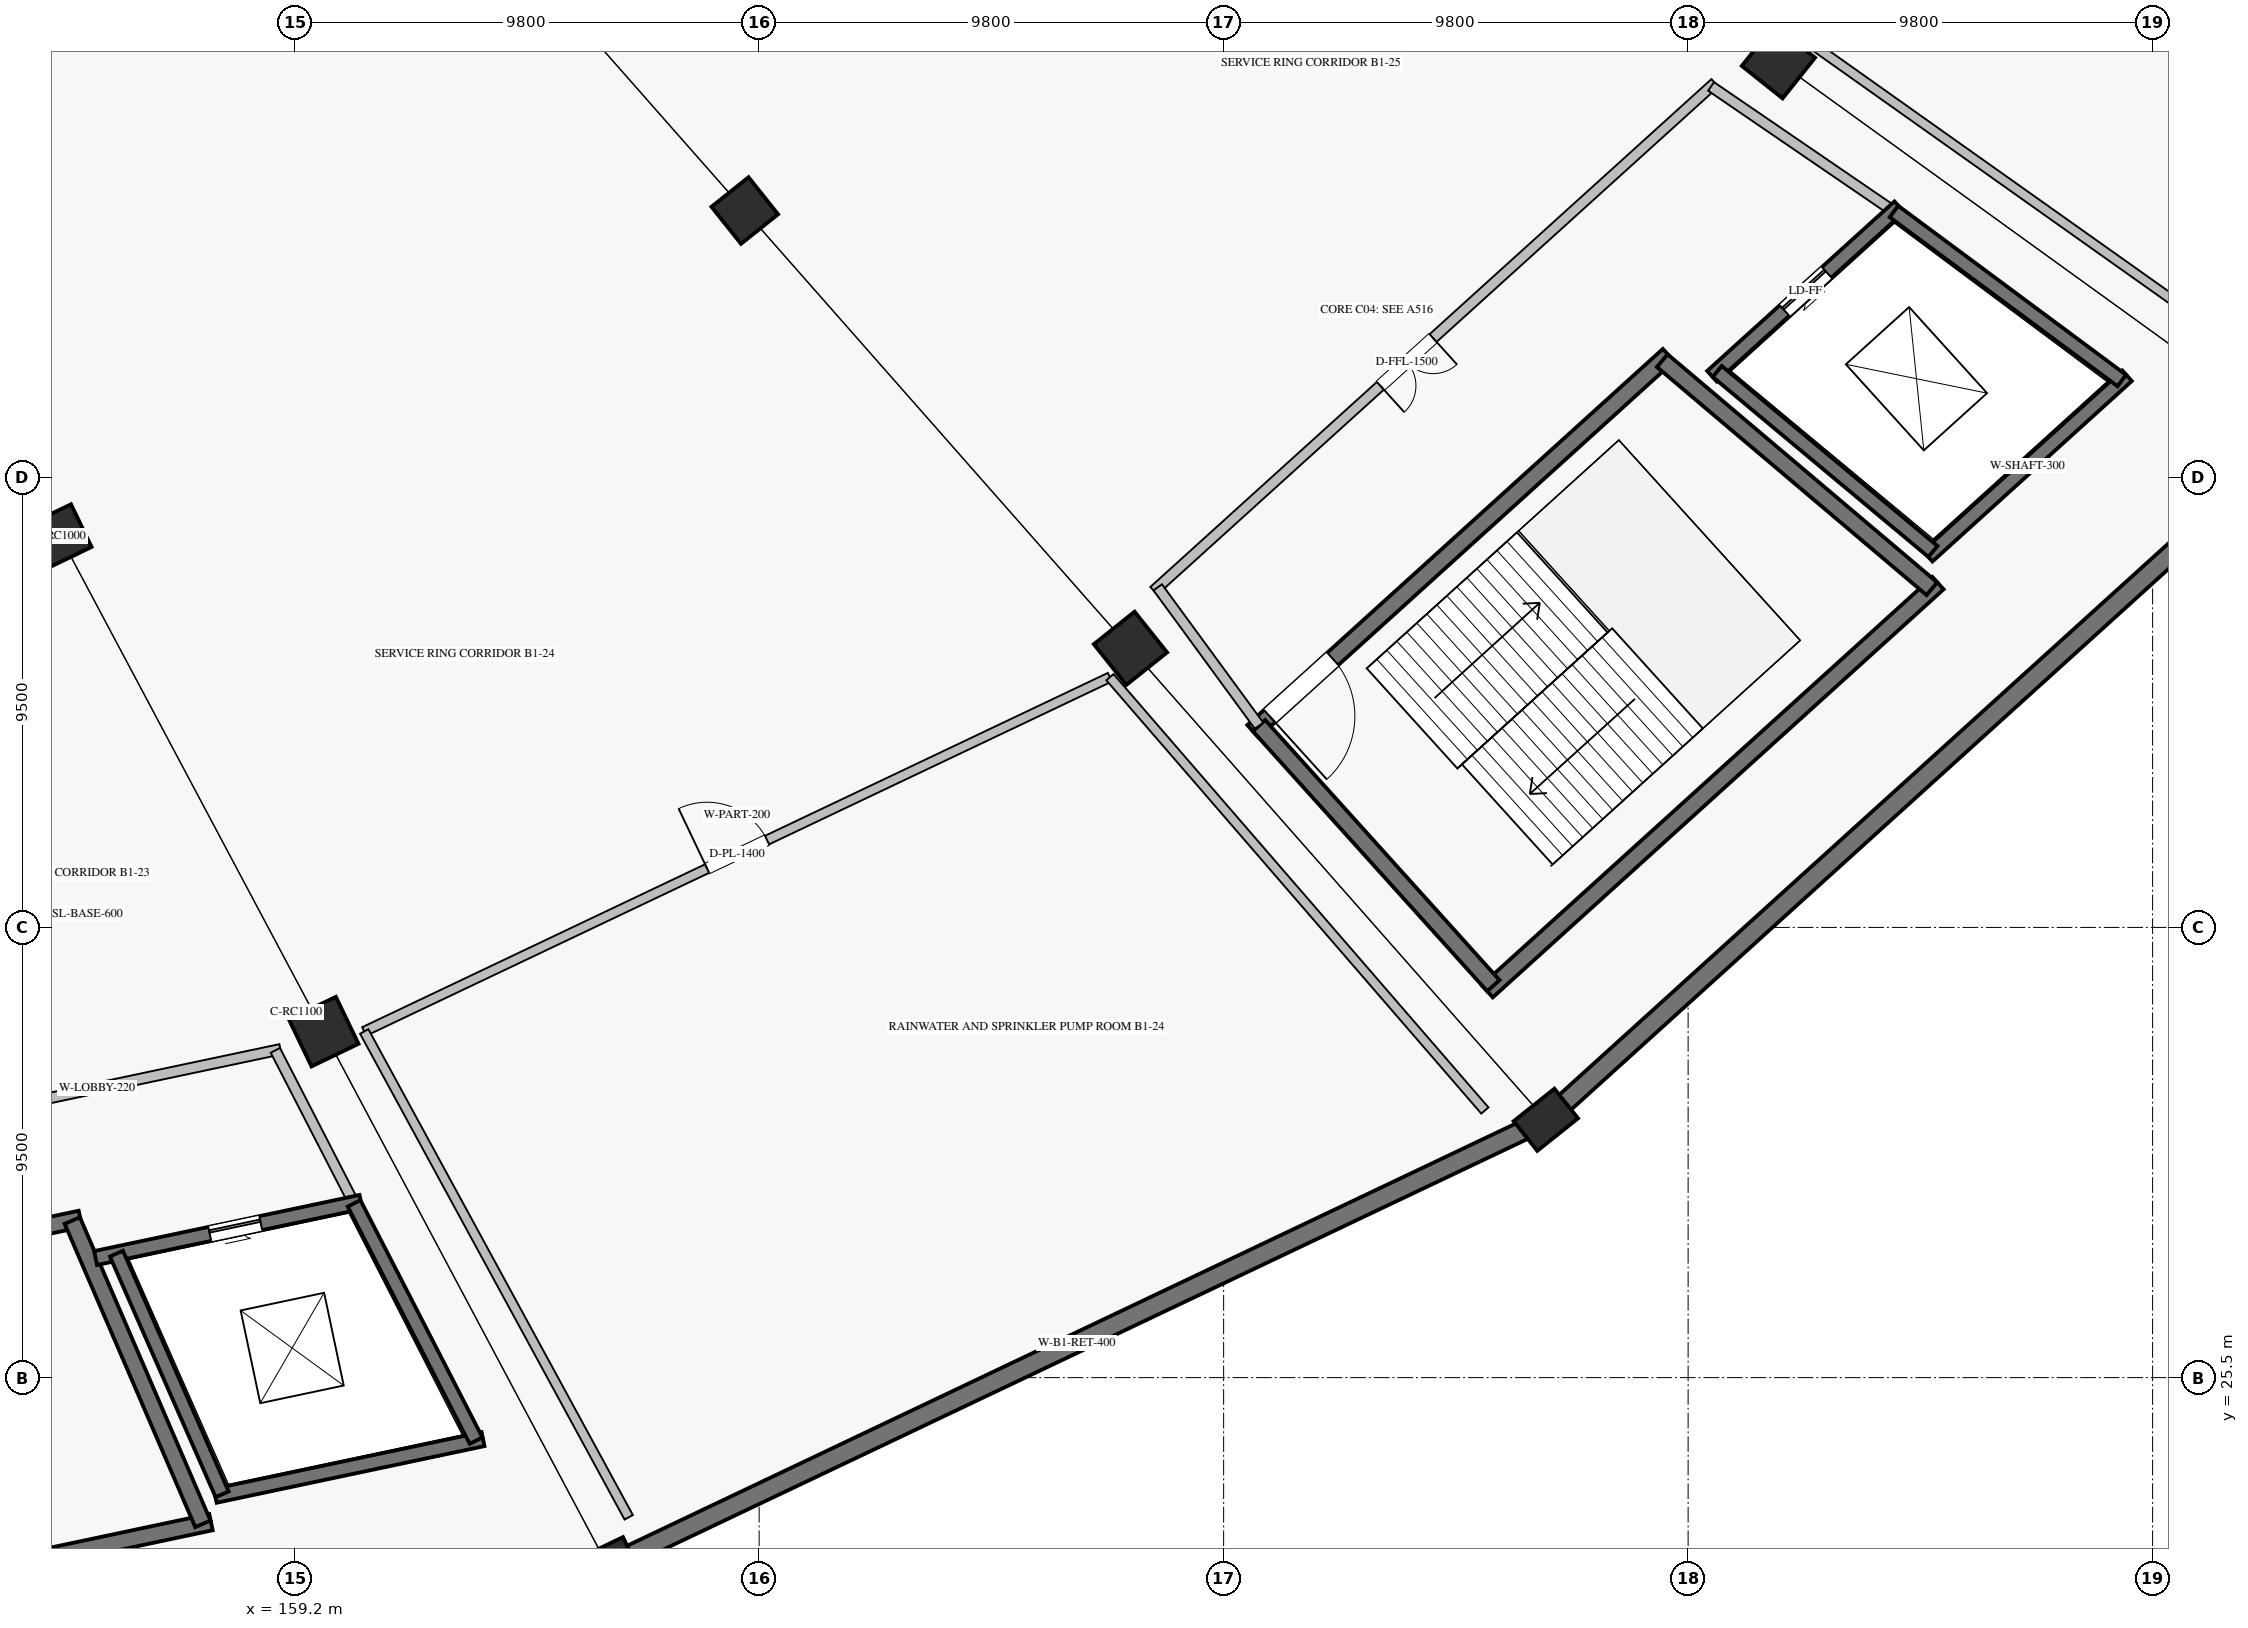
"""IFC4 building model, lengths in metres.
Left out: names, types, materials, properties, quantities, classifications, styles, units other than length and angle.
Written with IfcOpenShell. Run it as: python <this file> out.ifc"""

import sys

from ifc_helpers import new_model, si_unit, direction, frame, frame_2d, origin, origin_2d, place, context, subcontext, project, spatial, rectangle, extrude, element, fill, save


model = new_model("IFC4")
c1 = context("Model", 3, precision=1e-05, world=origin(), true_north=direction((0.0, 1.0)))
c2 = subcontext(c1, "Body", "Model", "MODEL_VIEW")
j1 = project(units=[si_unit("LENGTHUNIT", "METRE"), si_unit("PLANEANGLEUNIT", "RADIAN")], contexts=[c1])
p1 = place(None, origin())
s1 = spatial("IfcSite", under=j1, at=p1, CompositionType="ELEMENT")
p2 = place(p1, origin())
s2 = spatial("IfcBuilding", under=s1, at=p2, CompositionType="ELEMENT")
p3 = place(p2, frame((0.0, 0.0, -5.44)))
s3 = spatial("IfcBuildingStorey", under=s2, at=p3, CompositionType="ELEMENT", Elevation=-5.44)
for number, where, z_axis, x_axis in (
    (1, (154.248, 43.261, 0.0), (0.0, 0.0, 1.0), (0.434, -0.901, 0.0)),
    (2, (168.697, 50.127, 0.0), (0.0, 0.0, 1.0), (0.623, -0.782, 0.0)),
):
    element("IfcColumn", number, at=place(p3, frame(where, z_axis=z_axis, x_axis=x_axis)), inside=s3, PredefinedType="COLUMN", context=c2, shape_type="SweptSolid", body=[
        extrude(rectangle(XDim=1.0, YDim=1.0, at=origin_2d()), origin(), (0.0, 0.0, 1.0), 5.44),
    ])
for number, where, z_axis, x_axis in (
    (3, (159.812, 32.801, 0.0), (0.0, 0.0, 1.0), (0.434, -0.901, 0.0)),
    (4, (176.834, 40.889, 0.0), (0.0, 0.0, 1.0), (0.623, -0.782, 0.0)),
    (5, (190.506, 53.266, 0.0), (0.0, 0.0, 1.0), (0.782, -0.623, 0.0)),
):
    element("IfcColumn", number, at=place(p3, frame(where, z_axis=z_axis, x_axis=x_axis)), inside=s3, PredefinedType="COLUMN", context=c2, shape_type="SweptSolid", body=[
        extrude(rectangle(XDim=1.1, YDim=1.1, at=origin_2d()), origin(), (0.0, 0.0, 1.0), 5.44),
    ])
for number, where, z_axis, x_axis in (
    (6, (165.805, 21.536, 0.0), (0.0, 0.0, 1.0), (0.434, -0.901, 0.0)),
    (7, (185.598, 30.941, 0.0), (0.0, 0.0, 1.0), (0.623, -0.782, 0.0)),
):
    element("IfcColumn", number, at=place(p3, frame(where, z_axis=z_axis, x_axis=x_axis)), inside=s3, PredefinedType="COLUMN", context=c2, shape_type="SweptSolid", body=[
        extrude(rectangle(XDim=0.8, YDim=1.1, at=origin_2d()), origin(), (0.0, 0.0, 1.0), 5.44),
    ])
p4 = place(p3, frame((166.157, 21.703, 0.0), z_axis=(0.0, 0.0, 1.0), x_axis=(0.903214032263, 0.429190414528, 0.0)))
e8 = element("IfcWall", 8, at=p4, inside=s3, PredefinedType="SOLIDWALL", context=c2, shape_type="SweptSolid", body=[
    extrude(rectangle(XDim=21.134, YDim=0.4, at=frame_2d((10.567, 0.0))), origin(), (0.0, 0.0, 1.0), 4.42),
])
p5 = place(p3, frame((185.887, 31.203, 0.0), z_axis=(0.0, 0.0, 1.0), x_axis=(0.741354093053, 0.671114080253, 0.0)))
e9 = element("IfcWall", 9, at=p5, inside=s3, PredefinedType="SOLIDWALL", context=c2, shape_type="SweptSolid", body=[
    extrude(rectangle(XDim=20.664, YDim=0.4, at=frame_2d((10.332, 0.0))), origin(), (0.0, 0.0, 1.0), 4.42),
])
p6 = place(p3, frame((142.896, 26.357, 0.0), z_axis=(0.0, 0.0, 1.0), x_axis=(0.978345203961, 0.206979858648, 0.0)))
e10 = element("IfcWall", 10, at=p6, inside=s3, PredefinedType="SHEAR", context=c2, shape_type="SweptSolid", body=[
    extrude(rectangle(XDim=12.044, YDim=0.35, at=frame_2d((6.022, 0.0))), origin(), (0.0, 0.0, 1.0), 5.14),
])
p7 = place(p6, frame((0.475, 0.0, 0.0)))
e11 = element("IfcOpeningElement", 11, at=p7, cuts=e10, PredefinedType="OPENING", context=c2, shape_type="SweptSolid", body=[
    extrude(rectangle(XDim=1.8, YDim=2.2, at=frame_2d((0.9, 1.1))), frame((0.0, 0.185, 0.0), z_axis=(0.0, -1.0, 0.0), x_axis=(1.0, 0.0, 0.0)), (0.0, 0.0, 1.0), 0.37),
])
p8 = place(p3, frame((144.65, 19.746, 0.0), z_axis=(0.0, 0.0, 1.0), x_axis=(0.978345119536, 0.206980257705, 0.0)))
e12 = element("IfcWall", 12, at=p8, inside=s3, PredefinedType="SHEAR", context=c2, shape_type="SweptSolid", body=[
    extrude(rectangle(XDim=13.067, YDim=0.35, at=frame_2d((6.533, 0.0))), origin(), (0.0, 0.0, 1.0), 5.14),
])
p9 = place(p3, frame((154.508, 28.814, 0.0), z_axis=(0.0, 0.0, 1.0), x_axis=(0.395453834155, -0.918485854574, 0.0)))
e13 = element("IfcWall", 13, at=p9, inside=s3, PredefinedType="SHEAR", context=c2, shape_type="SweptSolid", body=[
    extrude(rectangle(XDim=6.968, YDim=0.35, at=frame_2d((3.484, 0.0))), origin(), (0.0, 0.0, 1.0), 5.14),
])
p10 = place(p3, frame((154.999, 28.023, 0.0), z_axis=(0.0, 0.0, 1.0), x_axis=(0.978345218992, 0.206979787601, 0.0)))
e14 = element("IfcWall", 14, at=p10, inside=s3, PredefinedType="SHEAR", context=c2, shape_type="SweptSolid", body=[
    extrude(rectangle(XDim=5.724, YDim=0.3, at=frame_2d((2.862, 0.0))), origin(), (0.0, 0.0, 1.0), 5.14),
])
p11 = place(p10, frame((2.462, 0.0, 0.0)))
e15 = element("IfcOpeningElement", 15, at=p11, cuts=e14, PredefinedType="OPENING", context=c2, shape_type="SweptSolid", body=[
    extrude(rectangle(XDim=1.1, YDim=2.2, at=frame_2d((0.55, 1.1))), frame((0.0, 0.16, 0.0), z_axis=(0.0, -1.0, 0.0), x_axis=(1.0, 0.0, 0.0)), (0.0, 0.0, 1.0), 0.32),
])
p12 = place(p3, frame((157.523, 23.006, 0.0), z_axis=(0.0, 0.0, 1.0), x_axis=(0.978347069901, 0.206971038591, 0.0)))
e16 = element("IfcWall", 16, at=p12, inside=s3, PredefinedType="SHEAR", context=c2, shape_type="SweptSolid", body=[
    extrude(rectangle(XDim=5.776, YDim=0.3, at=frame_2d((2.888, 0.0))), origin(), (0.0, 0.0, 1.0), 5.14),
])
p13 = place(p3, frame((155.44, 28.116, 0.0), z_axis=(0.0, 0.0, 1.0), x_axis=(0.402005363577, -0.915637312289, 0.0)))
e17 = element("IfcWall", 17, at=p13, inside=s3, PredefinedType="SHEAR", context=c2, shape_type="SweptSolid", body=[
    extrude(rectangle(XDim=5.547, YDim=0.3, at=frame_2d((2.773, 0.0))), origin(), (0.0, 0.0, 1.0), 5.14),
])
p14 = place(p3, frame((160.453, 29.177, 0.0), z_axis=(0.0, 0.0, 1.0), x_axis=(0.457368592987, -0.889277217829, 0.0)))
e18 = element("IfcWall", 18, at=p14, inside=s3, PredefinedType="SHEAR", context=c2, shape_type="SweptSolid", body=[
    extrude(rectangle(XDim=5.629, YDim=0.3, at=frame_2d((2.814, 0.0))), origin(), (0.0, 0.0, 1.0), 5.14),
])
p15 = place(p3, frame((142.284, 28.914, 0.0), z_axis=(0.0, 0.0, 1.0), x_axis=(0.97834522483, 0.206979760008, 0.0)))
e19 = element("IfcWall", 19, at=p15, inside=s3, PredefinedType="SOLIDWALL", context=c2, shape_type="SweptSolid", body=[
    extrude(rectangle(XDim=16.983, YDim=0.22, at=frame_2d((8.491, 0.0))), origin(), (0.0, 0.0, 1.0), 4.088),
])
p16 = place(p15, frame((6.903, 0.0, 0.0)))
e20 = element("IfcOpeningElement", 20, at=p16, cuts=e19, PredefinedType="OPENING", context=c2, shape_type="SweptSolid", body=[
    extrude(rectangle(XDim=1.5, YDim=2.2, at=frame_2d((0.75, 1.1))), frame((0.0, 0.12, 0.0), z_axis=(0.0, -1.0, 0.0), x_axis=(1.0, 0.0, 0.0)), (0.0, 0.0, 1.0), 0.24),
])
p17 = place(p3, frame((158.792, 32.406, 0.0), z_axis=(0.0, 0.0, 1.0), x_axis=(0.457349531643, -0.889287021105, 0.0)))
e21 = element("IfcWall", 21, at=p17, inside=s3, PredefinedType="SOLIDWALL", context=c2, shape_type="SweptSolid", body=[
    extrude(rectangle(XDim=3.632, YDim=0.22, at=frame_2d((1.816, 0.0))), origin(), (0.0, 0.0, 1.0), 5.14),
])
p18 = place(p3, frame((179.417, 39.14, 0.0), z_axis=(0.0, 0.0, 1.0), x_axis=(0.741348929385, 0.671119784315, 0.0)))
e22 = element("IfcWall", 22, at=p18, inside=s3, PredefinedType="SHEAR", context=c2, shape_type="SweptSolid", body=[
    extrude(rectangle(XDim=11.826, YDim=0.35, at=frame_2d((5.913, 0.0))), origin(), (0.0, 0.0, 1.0), 5.14),
])
p19 = place(p18, frame((0.475, 0.0, 0.0)))
e23 = element("IfcOpeningElement", 23, at=p19, cuts=e22, PredefinedType="OPENING", context=c2, shape_type="SweptSolid", body=[
    extrude(rectangle(XDim=1.8, YDim=2.2, at=frame_2d((0.9, 1.1))), frame((0.0, 0.185, 0.0), z_axis=(0.0, -1.0, 0.0), x_axis=(1.0, 0.0, 0.0)), (0.0, 0.0, 1.0), 0.37),
])
p20 = place(p3, frame((184.361, 33.653, 0.0), z_axis=(0.0, 0.0, 1.0), x_axis=(0.741351373721, 0.671117084183, 0.0)))
e24 = element("IfcWall", 24, at=p20, inside=s3, PredefinedType="SHEAR", context=c2, shape_type="SweptSolid", body=[
    extrude(rectangle(XDim=12.83, YDim=0.35, at=frame_2d((6.415, 0.0))), origin(), (0.0, 0.0, 1.0), 5.14),
])
p21 = place(p3, frame((179.546, 39.257, 0.0), z_axis=(0.0, 0.0, 1.0), x_axis=(0.669463145673, -0.742845270958, 0.0)))
e25 = element("IfcWall", 25, at=p21, inside=s3, PredefinedType="SHEAR", context=c2, shape_type="SweptSolid", body=[
    extrude(rectangle(XDim=7.386, YDim=0.35, at=frame_2d((3.693, 0.0))), origin(), (0.0, 0.0, 1.0), 5.14),
])
p22 = place(p3, frame((188.055, 46.959, 0.0), z_axis=(0.0, 0.0, 1.0), x_axis=(0.763422324031, -0.64589964791, 0.0)))
e26 = element("IfcWall", 26, at=p22, inside=s3, PredefinedType="SHEAR", context=c2, shape_type="SweptSolid", body=[
    extrude(rectangle(XDim=7.452, YDim=0.35, at=frame_2d((3.726, 0.0))), origin(), (0.0, 0.0, 1.0), 5.14),
])
p23 = place(p3, frame((189.103, 46.631, 0.0), z_axis=(0.0, 0.0, 1.0), x_axis=(0.741350155641, 0.671118429736, 0.0)))
e27 = element("IfcWall", 27, at=p23, inside=s3, PredefinedType="SHEAR", context=c2, shape_type="SweptSolid", body=[
    extrude(rectangle(XDim=5.329, YDim=0.3, at=frame_2d((2.665, 0.0))), origin(), (0.0, 0.0, 1.0), 5.14),
])
p24 = place(p23, frame((2.065, 0.0, 0.0)))
e28 = element("IfcOpeningElement", 28, at=p24, cuts=e27, PredefinedType="OPENING", context=c2, shape_type="SweptSolid", body=[
    extrude(rectangle(XDim=1.2, YDim=2.2, at=frame_2d((0.6, 1.1))), frame((0.0, 0.16, 0.0), z_axis=(0.0, -1.0, 0.0), x_axis=(1.0, 0.0, 0.0)), (0.0, 0.0, 1.0), 0.32),
])
p25 = place(p3, frame((193.654, 42.832, 0.0), z_axis=(0.0, 0.0, 1.0), x_axis=(0.74134208775, 0.671127341815, 0.0)))
e29 = element("IfcWall", 29, at=p25, inside=s3, PredefinedType="SHEAR", context=c2, shape_type="SweptSolid", body=[
    extrude(rectangle(XDim=5.675, YDim=0.3, at=frame_2d((2.837, 0.0))), origin(), (0.0, 0.0, 1.0), 5.14),
])
p26 = place(p3, frame((189.214, 46.732, 0.0), z_axis=(0.0, 0.0, 1.0), x_axis=(0.767711354146, -0.640795815151, 0.0)))
e30 = element("IfcWall", 30, at=p26, inside=s3, PredefinedType="SHEAR", context=c2, shape_type="SweptSolid", body=[
    extrude(rectangle(XDim=5.929, YDim=0.3, at=frame_2d((2.964, 0.0))), origin(), (0.0, 0.0, 1.0), 5.14),
])
p27 = place(p3, frame((192.942, 50.107, 0.0), z_axis=(0.0, 0.0, 1.0), x_axis=(0.803101805449, -0.59584183311, 0.0)))
e31 = element("IfcWall", 31, at=p27, inside=s3, PredefinedType="SHEAR", context=c2, shape_type="SweptSolid", body=[
    extrude(rectangle(XDim=5.986, YDim=0.3, at=frame_2d((2.993, 0.0))), origin(), (0.0, 0.0, 1.0), 5.14),
])
p28 = place(p3, frame((177.327, 42.102, 0.0), z_axis=(0.0, 0.0, 1.0), x_axis=(0.741351035574, 0.671117457717, 0.0)))
e32 = element("IfcWall", 32, at=p28, inside=s3, PredefinedType="SOLIDWALL", context=c2, shape_type="SweptSolid", body=[
    extrude(rectangle(XDim=15.969, YDim=0.22, at=frame_2d((7.985, 0.0))), origin(), (0.0, 0.0, 1.0), 5.14),
])
p29 = place(p28, frame((6.447, 0.0, 0.0)))
e33 = element("IfcOpeningElement", 33, at=p29, cuts=e32, PredefinedType="OPENING", context=c2, shape_type="SweptSolid", body=[
    extrude(rectangle(XDim=1.5, YDim=2.2, at=frame_2d((0.75, 1.1))), frame((0.0, 0.12, 0.0), z_axis=(0.0, -1.0, 0.0), x_axis=(1.0, 0.0, 0.0)), (0.0, 0.0, 1.0), 0.24),
])
p30 = place(p3, frame((177.409, 42.176, 0.0), z_axis=(0.0, 0.0, 1.0), x_axis=(0.590836915359, -0.806791013491, 0.0)))
e34 = element("IfcWall", 34, at=p30, inside=s3, PredefinedType="SOLIDWALL", context=c2, shape_type="SweptSolid", body=[
    extrude(rectangle(XDim=3.618, YDim=0.22, at=frame_2d((1.809, 0.0))), origin(), (0.0, 0.0, 1.0), 5.14),
])
p31 = place(p3, frame((189.085, 52.746, 0.0), z_axis=(0.0, 0.0, 1.0), x_axis=(0.825385410642, -0.564569680287, 0.0)))
e35 = element("IfcWall", 35, at=p31, inside=s3, PredefinedType="SOLIDWALL", context=c2, shape_type="SweptSolid", body=[
    extrude(rectangle(XDim=4.674, YDim=0.22, at=frame_2d((2.337, 0.0))), origin(), (0.0, 0.0, 1.0), 5.14),
])
p32 = place(p3, frame((160.667, 32.804, 0.0), z_axis=(0.0, 0.0, 1.0), x_axis=(0.903217202186, 0.429183743488, 0.0)))
e36 = element("IfcWall", 36, at=p32, inside=s3, PredefinedType="PARTITIONING", context=c2, shape_type="SweptSolid", body=[
    extrude(rectangle(XDim=17.419, YDim=0.2, at=frame_2d((8.709, 0.0))), origin(), (0.0, 0.0, 1.0), 4.46),
])
p33 = place(p32, frame((8.01, 0.0, 0.0)))
e37 = element("IfcOpeningElement", 37, at=p33, cuts=e36, PredefinedType="OPENING", context=c2, shape_type="SweptSolid", body=[
    extrude(rectangle(XDim=1.4, YDim=2.2, at=frame_2d((0.7, 1.1))), frame((0.0, 0.11, 0.0), z_axis=(0.0, -1.0, 0.0), x_axis=(1.0, 0.0, 0.0)), (0.0, 0.0, 1.0), 0.22),
])
p34 = place(p3, frame((160.667, 32.804, 0.0), z_axis=(0.0, 0.0, 1.0), x_axis=(0.478125060974, -0.878291765912, 0.0)))
e38 = element("IfcWall", 38, at=p34, inside=s3, PredefinedType="PARTITIONING", context=c2, shape_type="SweptSolid", body=[
    extrude(rectangle(XDim=11.672, YDim=0.2, at=frame_2d((5.836, 0.0))), origin(), (0.0, 0.0, 1.0), 4.46),
])
p35 = place(p3, frame((176.401, 40.28, 0.0), z_axis=(0.0, 0.0, 1.0), x_axis=(0.654293035882, -0.756241114458, 0.0)))
e39 = element("IfcWall", 39, at=p35, inside=s3, PredefinedType="PARTITIONING", context=c2, shape_type="SweptSolid", body=[
    extrude(rectangle(XDim=12.091, YDim=0.2, at=frame_2d((6.045, 0.0))), origin(), (0.0, 0.0, 1.0), 4.46),
])
p36 = place(p3, frame((191.179, 53.658, 0.0), z_axis=(0.0, 0.0, 1.0), x_axis=(0.815753527099, -0.578399674122, 0.0)))
e40 = element("IfcWall", 40, at=p36, inside=s3, PredefinedType="PARTITIONING", context=c2, shape_type="SweptSolid", body=[
    extrude(rectangle(XDim=12.382, YDim=0.2, at=frame_2d((6.191, 0.0))), origin(), (0.0, 0.0, 1.0), 4.46),
])
p37 = place(p11, origin())
e41 = element("IfcDoor", 41, at=p37, inside=s3, OperationType="SLIDING_TO_RIGHT", PredefinedType="DOOR", context=c2, shape_type="SweptSolid", body=[
    extrude(rectangle(XDim=1.1, YDim=2.2, at=frame_2d((0.55, 1.1))), frame((0.0, 0.025, 0.0), z_axis=(0.0, -1.0, 0.0), x_axis=(1.0, 0.0, 0.0)), (0.0, 0.0, 1.0), 0.05),
])
fill(e15, e41)
p38 = place(p19, frame((1.8, 0.0, 0.0), z_axis=(0.0, 0.0, 1.0), x_axis=(-1.0, 0.0, 0.0)))
e42 = element("IfcDoor", 42, at=p38, inside=s3, OperationType="SINGLE_SWING_RIGHT", PredefinedType="DOOR", context=c2, shape_type="SweptSolid", body=[
    extrude(rectangle(XDim=1.8, YDim=2.2, at=frame_2d((0.9, 1.1))), frame((0.0, 0.025, 0.0), z_axis=(0.0, -1.0, 0.0), x_axis=(1.0, 0.0, 0.0)), (0.0, 0.0, 1.0), 0.05),
])
fill(e23, e42)
p39 = place(p24, origin())
e43 = element("IfcDoor", 43, at=p39, inside=s3, OperationType="SLIDING_TO_LEFT", PredefinedType="DOOR", context=c2, shape_type="SweptSolid", body=[
    extrude(rectangle(XDim=1.2, YDim=2.2, at=frame_2d((0.6, 1.1))), frame((0.0, 0.025, 0.0), z_axis=(0.0, -1.0, 0.0), x_axis=(1.0, 0.0, 0.0)), (0.0, 0.0, 1.0), 0.05),
])
fill(e28, e43)
p40 = place(p29, frame((1.5, 0.0, 0.0), z_axis=(0.0, 0.0, 1.0), x_axis=(-1.0, 0.0, 0.0)))
e44 = element("IfcDoor", 44, at=p40, inside=s3, OperationType="DOUBLE_DOOR_SINGLE_SWING", PredefinedType="DOOR", context=c2, shape_type="SweptSolid", body=[
    extrude(rectangle(XDim=1.5, YDim=2.2, at=frame_2d((0.75, 1.1))), frame((0.0, 0.025, 0.0), z_axis=(0.0, -1.0, 0.0), x_axis=(1.0, 0.0, 0.0)), (0.0, 0.0, 1.0), 0.05),
])
fill(e33, e44)
p41 = place(p33, origin())
e45 = element("IfcDoor", 45, at=p41, inside=s3, OperationType="SINGLE_SWING_LEFT", PredefinedType="DOOR", context=c2, shape_type="SweptSolid", body=[
    extrude(rectangle(XDim=1.4, YDim=2.2, at=frame_2d((0.7, 1.1))), frame((0.0, 0.025, 0.0), z_axis=(0.0, -1.0, 0.0), x_axis=(1.0, 0.0, 0.0)), (0.0, 0.0, 1.0), 0.05),
])
fill(e37, e45)
save(model, sys.argv[1])
